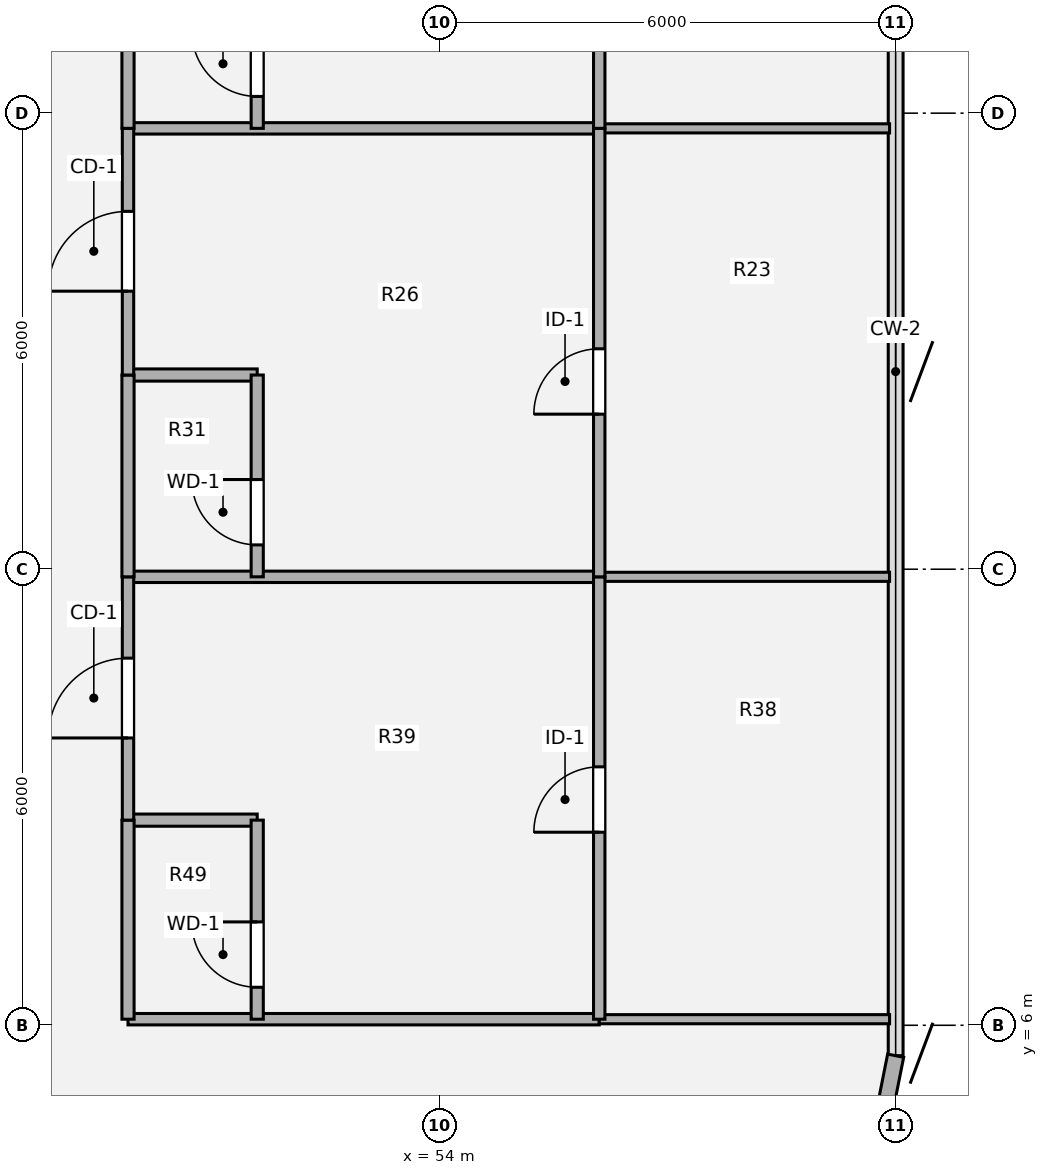
"""IFC4 building model, lengths in metres.
Left out: names, types, materials, properties, quantities, classifications, styles, units other than length and angle.
Written with IfcOpenShell. Run it as: python <this file> out.ifc"""

import sys

from ifc_helpers import new_model, si_unit, direction, frame, frame_2d, origin, origin_2d, place, context, subcontext, project, spatial, rectangle, extrude, source, transform, mapped, element, fill, save


model = new_model("IFC4")
c1 = context("Model", 3, precision=1e-05, world=origin(), true_north=direction((0.0, 1.0)))
c2 = subcontext(c1, "Body", "Model", "MODEL_VIEW")
j1 = project(units=[si_unit("LENGTHUNIT", "METRE"), si_unit("PLANEANGLEUNIT", "RADIAN")], contexts=[c1])
p1 = place(None, origin())
s1 = spatial("IfcSite", under=j1, at=p1, CompositionType="ELEMENT")
p2 = place(p1, origin())
s2 = spatial("IfcBuilding", under=s1, at=p2, CompositionType="ELEMENT")
p3 = place(p2, frame((0.0, 0.0, 42.12)))
s3 = spatial("IfcBuildingStorey", under=s2, at=p3, CompositionType="ELEMENT", Elevation=42.12)
p4 = place(p3, frame((60.0, 5.6, 0.0), z_axis=(0.0, 0.0, 1.0), x_axis=(-0.195138390419, -0.980775717779, 0.0)))
e1 = element("IfcWall", 1, at=p4, inside=s3, PredefinedType="SOLIDWALL", context=c2, shape_type="SweptSolid", body=[
    extrude(rectangle(XDim=1.249, YDim=0.215, at=frame_2d((0.624, 0.0))), origin(), (0.0, 0.0, 1.0), 3.53),
])
p5 = place(p3, frame((49.9, 6.08, 0.0), z_axis=(0.0, 0.0, 1.0), x_axis=(1.0, 0.0, 0.0)))
e2 = element("IfcWall", 2, at=p5, inside=s3, PredefinedType="PARTITIONING", context=c2, shape_type="SweptSolid", body=[
    extrude(rectangle(XDim=6.2, YDim=0.15, at=frame_2d((3.1, 0.0))), origin(), (0.0, 0.0, 1.0), 3.5),
])
p6 = place(p3, frame((56.1, 6.08, 0.0), z_axis=(0.0, 0.0, 1.0), x_axis=(1.0, 0.0, 0.0)))
e3 = element("IfcWall", 3, at=p6, inside=s3, PredefinedType="PARTITIONING", context=c2, shape_type="SweptSolid", body=[
    extrude(rectangle(XDim=3.82, YDim=0.12, at=frame_2d((1.91, 0.0))), origin(), (0.0, 0.0, 1.0), 3.5),
])
p7 = place(p3, frame((49.9, 8.699, 0.0), z_axis=(0.0, 0.0, 1.0), x_axis=(1.0, 0.0, 0.0)))
e4 = element("IfcWall", 4, at=p7, inside=s3, PredefinedType="PLUMBINGWALL", context=c2, shape_type="SweptSolid", body=[
    extrude(rectangle(XDim=1.7, YDim=0.16, at=frame_2d((0.85, 0.0))), origin(), (0.0, 0.0, 1.0), 3.5),
])
p8 = place(p3, frame((49.9, 11.9, 0.0), z_axis=(0.0, 0.0, 1.0), x_axis=(1.0, 0.0, 0.0)))
e5 = element("IfcWall", 5, at=p8, inside=s3, PredefinedType="PARTITIONING", context=c2, shape_type="SweptSolid", body=[
    extrude(rectangle(XDim=6.2, YDim=0.15, at=frame_2d((3.1, 0.0))), origin(), (0.0, 0.0, 1.0), 3.5),
])
p9 = place(p3, frame((56.1, 11.9, 0.0), z_axis=(0.0, 0.0, 1.0), x_axis=(1.0, 0.0, 0.0)))
e6 = element("IfcWall", 6, at=p9, inside=s3, PredefinedType="PARTITIONING", context=c2, shape_type="SweptSolid", body=[
    extrude(rectangle(XDim=3.82, YDim=0.12, at=frame_2d((1.91, 0.0))), origin(), (0.0, 0.0, 1.0), 3.5),
])
p10 = place(p3, frame((49.9, 14.555, 0.0), z_axis=(0.0, 0.0, 1.0), x_axis=(1.0, 0.0, 0.0)))
e7 = element("IfcWall", 7, at=p10, inside=s3, PredefinedType="PLUMBINGWALL", context=c2, shape_type="SweptSolid", body=[
    extrude(rectangle(XDim=1.7, YDim=0.16, at=frame_2d((0.85, 0.0))), origin(), (0.0, 0.0, 1.0), 3.5),
])
p11 = place(p3, frame((49.9, 17.8, 0.0), z_axis=(0.0, 0.0, 1.0), x_axis=(1.0, 0.0, 0.0)))
e8 = element("IfcWall", 8, at=p11, inside=s3, PredefinedType="PARTITIONING", context=c2, shape_type="SweptSolid", body=[
    extrude(rectangle(XDim=6.2, YDim=0.15, at=frame_2d((3.1, 0.0))), origin(), (0.0, 0.0, 1.0), 3.5),
])
p12 = place(p3, frame((56.1, 17.8, 0.0), z_axis=(0.0, 0.0, 1.0), x_axis=(1.0, 0.0, 0.0)))
e9 = element("IfcWall", 9, at=p12, inside=s3, PredefinedType="PARTITIONING", context=c2, shape_type="SweptSolid", body=[
    extrude(rectangle(XDim=3.82, YDim=0.12, at=frame_2d((1.91, 0.0))), origin(), (0.0, 0.0, 1.0), 3.5),
])
p13 = place(p3, frame((49.9, 6.08, 0.0), z_axis=(0.0, 0.0, 1.0), x_axis=(0.0, 1.0, 0.0)))
e10 = element("IfcWall", 10, at=p13, inside=s3, PredefinedType="PLUMBINGWALL", context=c2, shape_type="SweptSolid", body=[
    extrude(rectangle(XDim=2.619, YDim=0.16, at=frame_2d((1.31, 0.0))), origin(), (0.0, 0.0, 1.0), 3.5),
])
p14 = place(p3, frame((49.9, 8.699, 0.0), z_axis=(0.0, 0.0, 1.0), x_axis=(0.0, 1.0, 0.0)))
e11 = element("IfcWall", 11, at=p14, inside=s3, PredefinedType="PARTITIONING", context=c2, shape_type="SweptSolid", body=[
    extrude(rectangle(XDim=3.201, YDim=0.15, at=frame_2d((1.601, 0.0))), origin(), (0.0, 0.0, 1.0), 3.5),
])
p15 = place(p14, frame((1.081, 0.0, 0.0)))
e12 = element("IfcOpeningElement", 12, at=p15, cuts=e11, PredefinedType="OPENING", context=c2, shape_type="SweptSolid", body=[
    extrude(rectangle(XDim=1.05, YDim=2.1, at=origin_2d()), frame((0.525, 0.085, 1.05), z_axis=(0.0, -1.0, 0.0), x_axis=(1.0, 0.0, 0.0)), (0.0, 0.0, 1.0), 0.17),
])
p16 = place(p3, frame((49.9, 11.9, 0.0), z_axis=(0.0, 0.0, 1.0), x_axis=(0.0, 1.0, 0.0)))
e13 = element("IfcWall", 13, at=p16, inside=s3, PredefinedType="PLUMBINGWALL", context=c2, shape_type="SweptSolid", body=[
    extrude(rectangle(XDim=2.655, YDim=0.16, at=frame_2d((1.328, 0.0))), origin(), (0.0, 0.0, 1.0), 3.5),
])
p17 = place(p3, frame((49.9, 14.555, 0.0), z_axis=(0.0, 0.0, 1.0), x_axis=(0.0, 1.0, 0.0)))
e14 = element("IfcWall", 14, at=p17, inside=s3, PredefinedType="PARTITIONING", context=c2, shape_type="SweptSolid", body=[
    extrude(rectangle(XDim=3.245, YDim=0.15, at=frame_2d((1.623, 0.0))), origin(), (0.0, 0.0, 1.0), 3.5),
])
p18 = place(p17, frame((1.103, 0.0, 0.0)))
e15 = element("IfcOpeningElement", 15, at=p18, cuts=e14, PredefinedType="OPENING", context=c2, shape_type="SweptSolid", body=[
    extrude(rectangle(XDim=1.05, YDim=2.1, at=origin_2d()), frame((0.525, 0.085, 1.05), z_axis=(0.0, -1.0, 0.0), x_axis=(1.0, 0.0, 0.0)), (0.0, 0.0, 1.0), 0.17),
])
p19 = place(p3, frame((49.9, 17.8, 0.0), z_axis=(0.0, 0.0, 1.0), x_axis=(0.0, 1.0, 0.0)))
e16 = element("IfcWall", 16, at=p19, inside=s3, PredefinedType="PLUMBINGWALL", context=c2, shape_type="SweptSolid", body=[
    extrude(rectangle(XDim=2.655, YDim=0.16, at=frame_2d((1.328, 0.0))), origin(), (0.0, 0.0, 1.0), 3.5),
])
p20 = place(p3, frame((51.6, 6.08, 0.0), z_axis=(0.0, 0.0, 1.0), x_axis=(0.0, 1.0, 0.0)))
e17 = element("IfcWall", 17, at=p20, inside=s3, PredefinedType="PLUMBINGWALL", context=c2, shape_type="SweptSolid", body=[
    extrude(rectangle(XDim=2.619, YDim=0.16, at=frame_2d((1.31, 0.0))), origin(), (0.0, 0.0, 1.0), 3.5),
])
p21 = place(p20, frame((0.42, 0.0, 0.0)))
e18 = element("IfcOpeningElement", 18, at=p21, cuts=e17, PredefinedType="OPENING", context=c2, shape_type="SweptSolid", body=[
    extrude(rectangle(XDim=0.86, YDim=2.1, at=origin_2d()), frame((0.43, 0.09, 1.05), z_axis=(0.0, -1.0, 0.0), x_axis=(1.0, 0.0, 0.0)), (0.0, 0.0, 1.0), 0.18),
])
p22 = place(p3, frame((51.6, 11.9, 0.0), z_axis=(0.0, 0.0, 1.0), x_axis=(0.0, 1.0, 0.0)))
e19 = element("IfcWall", 19, at=p22, inside=s3, PredefinedType="PLUMBINGWALL", context=c2, shape_type="SweptSolid", body=[
    extrude(rectangle(XDim=2.655, YDim=0.16, at=frame_2d((1.328, 0.0))), origin(), (0.0, 0.0, 1.0), 3.5),
])
p23 = place(p22, frame((0.42, 0.0, 0.0)))
e20 = element("IfcOpeningElement", 20, at=p23, cuts=e19, PredefinedType="OPENING", context=c2, shape_type="SweptSolid", body=[
    extrude(rectangle(XDim=0.86, YDim=2.1, at=origin_2d()), frame((0.43, 0.09, 1.05), z_axis=(0.0, -1.0, 0.0), x_axis=(1.0, 0.0, 0.0)), (0.0, 0.0, 1.0), 0.18),
])
p24 = place(p3, frame((51.6, 17.8, 0.0), z_axis=(0.0, 0.0, 1.0), x_axis=(0.0, 1.0, 0.0)))
e21 = element("IfcWall", 21, at=p24, inside=s3, PredefinedType="PLUMBINGWALL", context=c2, shape_type="SweptSolid", body=[
    extrude(rectangle(XDim=2.655, YDim=0.16, at=frame_2d((1.328, 0.0))), origin(), (0.0, 0.0, 1.0), 3.5),
])
p25 = place(p24, frame((0.42, 0.0, 0.0)))
e22 = element("IfcOpeningElement", 22, at=p25, cuts=e21, PredefinedType="OPENING", context=c2, shape_type="SweptSolid", body=[
    extrude(rectangle(XDim=0.86, YDim=2.1, at=origin_2d()), frame((0.43, 0.09, 1.05), z_axis=(0.0, -1.0, 0.0), x_axis=(1.0, 0.0, 0.0)), (0.0, 0.0, 1.0), 0.18),
])
p26 = place(p3, frame((56.1, 6.08, 0.0), z_axis=(0.0, 0.0, 1.0), x_axis=(0.0, 1.0, 0.0)))
e23 = element("IfcWall", 23, at=p26, inside=s3, PredefinedType="PARTITIONING", context=c2, shape_type="SweptSolid", body=[
    extrude(rectangle(XDim=5.82, YDim=0.15, at=frame_2d((2.91, 0.0))), origin(), (0.0, 0.0, 1.0), 3.5),
])
p27 = place(p26, frame((2.46, 0.0, 0.0)))
e24 = element("IfcOpeningElement", 24, at=p27, cuts=e23, PredefinedType="OPENING", context=c2, shape_type="SweptSolid", body=[
    extrude(rectangle(XDim=0.86, YDim=2.1, at=origin_2d()), frame((0.43, 0.085, 1.05), z_axis=(0.0, -1.0, 0.0), x_axis=(1.0, 0.0, 0.0)), (0.0, 0.0, 1.0), 0.17),
])
p28 = place(p3, frame((56.1, 11.9, 0.0), z_axis=(0.0, 0.0, 1.0), x_axis=(0.0, 1.0, 0.0)))
e25 = element("IfcWall", 25, at=p28, inside=s3, PredefinedType="PARTITIONING", context=c2, shape_type="SweptSolid", body=[
    extrude(rectangle(XDim=5.9, YDim=0.15, at=frame_2d((2.95, 0.0))), origin(), (0.0, 0.0, 1.0), 3.5),
])
p29 = place(p28, frame((2.14, 0.0, 0.0)))
e26 = element("IfcOpeningElement", 26, at=p29, cuts=e25, PredefinedType="OPENING", context=c2, shape_type="SweptSolid", body=[
    extrude(rectangle(XDim=0.86, YDim=2.1, at=origin_2d()), frame((0.43, 0.085, 1.05), z_axis=(0.0, -1.0, 0.0), x_axis=(1.0, 0.0, 0.0)), (0.0, 0.0, 1.0), 0.17),
])
p30 = place(p3, frame((56.1, 17.8, 0.0), z_axis=(0.0, 0.0, 1.0), x_axis=(0.0, 1.0, 0.0)))
e27 = element("IfcWall", 27, at=p30, inside=s3, PredefinedType="PARTITIONING", context=c2, shape_type="SweptSolid", body=[
    extrude(rectangle(XDim=5.9, YDim=0.15, at=frame_2d((2.95, 0.0))), origin(), (0.0, 0.0, 1.0), 3.5),
])
p31 = place(p30, frame((3.44, 0.0, 0.0)))
e28 = element("IfcOpeningElement", 28, at=p31, cuts=e27, PredefinedType="OPENING", context=c2, shape_type="SweptSolid", body=[
    extrude(rectangle(XDim=0.86, YDim=2.1, at=origin_2d()), frame((0.43, 0.085, 1.05), z_axis=(0.0, -1.0, 0.0), x_axis=(1.0, 0.0, 0.0)), (0.0, 0.0, 1.0), 0.17),
])
m1 = source(origin(), c2, "Body", "SweptSolid", [
    extrude(rectangle(XDim=1.05, YDim=2.1, at=origin_2d()), frame((0.525, 0.025, 1.05), z_axis=(0.0, -1.0, 0.0), x_axis=(1.0, 0.0, 0.0)), (0.0, 0.0, 1.0), 0.05),
])
p32 = place(p15, origin())
e29 = element("IfcDoor", 29, at=p32, inside=s3, OperationType="SINGLE_SWING_LEFT", PredefinedType="DOOR", context=c2, shape_type="MappedRepresentation", body=[
    mapped(m1, transform((0.0, 0.0, 0.0), x_axis=(1.0, 0.0, 0.0), y_axis=(0.0, 1.0, 0.0), z_axis=(0.0, 0.0, 1.0), scale=1.0)),
])
fill(e12, e29)
p33 = place(p18, origin())
e30 = element("IfcDoor", 30, at=p33, inside=s3, OperationType="SINGLE_SWING_LEFT", PredefinedType="DOOR", context=c2, shape_type="MappedRepresentation", body=[
    mapped(m1, transform((0.0, 0.0, 0.0), x_axis=(1.0, 0.0, 0.0), y_axis=(0.0, 1.0, 0.0), z_axis=(0.0, 0.0, 1.0), scale=1.0)),
])
fill(e15, e30)
m2 = source(origin(), c2, "Body", "SweptSolid", [
    extrude(rectangle(XDim=0.86, YDim=2.1, at=origin_2d()), frame((0.43, 0.025, 1.05), z_axis=(0.0, -1.0, 0.0), x_axis=(1.0, 0.0, 0.0)), (0.0, 0.0, 1.0), 0.05),
])
p34 = place(p21, origin())
e31 = element("IfcDoor", 31, at=p34, inside=s3, OperationType="SINGLE_SWING_RIGHT", PredefinedType="DOOR", context=c2, shape_type="MappedRepresentation", body=[
    mapped(m2, transform((0.0, 0.0, 0.0), x_axis=(1.0, 0.0, 0.0), y_axis=(0.0, 1.0, 0.0), z_axis=(0.0, 0.0, 1.0), scale=1.0)),
])
fill(e18, e31)
p35 = place(p23, origin())
e32 = element("IfcDoor", 32, at=p35, inside=s3, OperationType="SINGLE_SWING_RIGHT", PredefinedType="DOOR", context=c2, shape_type="MappedRepresentation", body=[
    mapped(m2, transform((0.0, 0.0, 0.0), x_axis=(1.0, 0.0, 0.0), y_axis=(0.0, 1.0, 0.0), z_axis=(0.0, 0.0, 1.0), scale=1.0)),
])
fill(e20, e32)
p36 = place(p25, origin())
e33 = element("IfcDoor", 33, at=p36, inside=s3, OperationType="SINGLE_SWING_RIGHT", PredefinedType="DOOR", context=c2, shape_type="MappedRepresentation", body=[
    mapped(m2, transform((0.0, 0.0, 0.0), x_axis=(1.0, 0.0, 0.0), y_axis=(0.0, 1.0, 0.0), z_axis=(0.0, 0.0, 1.0), scale=1.0)),
])
fill(e22, e33)
m3 = source(origin(), c2, "Body", "SweptSolid", [
    extrude(rectangle(XDim=0.86, YDim=2.1, at=origin_2d()), frame((0.43, 0.025, 1.05), z_axis=(0.0, -1.0, 0.0), x_axis=(1.0, 0.0, 0.0)), (0.0, 0.0, 1.0), 0.05),
])
p37 = place(p27, origin())
e34 = element("IfcDoor", 34, at=p37, inside=s3, OperationType="SINGLE_SWING_LEFT", PredefinedType="DOOR", context=c2, shape_type="MappedRepresentation", body=[
    mapped(m3, transform((0.0, 0.0, 0.0), x_axis=(1.0, 0.0, 0.0), y_axis=(0.0, 1.0, 0.0), z_axis=(0.0, 0.0, 1.0), scale=1.0)),
])
fill(e24, e34)
p38 = place(p29, origin())
e35 = element("IfcDoor", 35, at=p38, inside=s3, OperationType="SINGLE_SWING_LEFT", PredefinedType="DOOR", context=c2, shape_type="MappedRepresentation", body=[
    mapped(m3, transform((0.0, 0.0, 0.0), x_axis=(1.0, 0.0, 0.0), y_axis=(0.0, 1.0, 0.0), z_axis=(0.0, 0.0, 1.0), scale=1.0)),
])
fill(e26, e35)
save(model, sys.argv[1])
